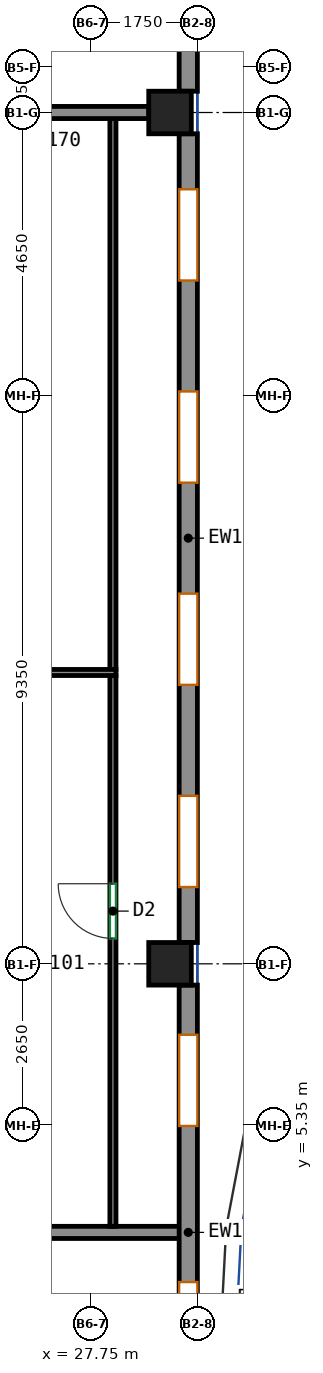
"""IFC4 building model, lengths in metres.
Left out: names, types, materials, properties, quantities, classifications, styles, units other than length and angle.
Written with IfcOpenShell. Run it as: python <this file> out.ifc"""

import sys

from ifc_helpers import new_model, si_unit, direction, frame, frame_2d, origin, origin_2d, place, context, subcontext, project, spatial, rectangle, extrude, source, transform, mapped, element, fill, save


model = new_model("IFC4")
c1 = context("Model", 3, precision=1e-05, world=origin(), true_north=direction((0.0, 1.0)))
c2 = subcontext(c1, "Body", "Model", "MODEL_VIEW")
j1 = project(units=[si_unit("LENGTHUNIT", "METRE"), si_unit("PLANEANGLEUNIT", "RADIAN")], contexts=[c1])
p1 = place(None, origin())
s1 = spatial("IfcSite", under=j1, at=p1, CompositionType="ELEMENT")
p2 = place(p1, origin())
s2 = spatial("IfcBuilding", under=s1, at=p2, CompositionType="ELEMENT")
p3 = place(p2, frame((0.0, 0.0, 252.6)))
s3 = spatial("IfcBuildingStorey", under=s2, at=p3, CompositionType="ELEMENT", Elevation=252.6)
m1 = source(origin(), c2, "Body", "SweptSolid", [
    extrude(rectangle(XDim=0.7, YDim=0.7, at=origin_2d()), origin(), (0.0, 0.0, 1.0), 3.12),
])
for number, where, z_axis, x_axis in (
    (1, (29.05, 8.0, 0.0), (0.0, 0.0, 1.0), (1.0, 0.0, 0.0)),
    (2, (29.05, 22.0, 0.0), (0.0, 0.0, 1.0), (1.0, 0.0, 0.0)),
):
    element("IfcColumn", number, at=place(p3, frame(where, z_axis=z_axis, x_axis=x_axis)), inside=s3, PredefinedType="COLUMN", context=c2, shape_type="MappedRepresentation", body=[
        mapped(m1, transform((0.0, 0.0, 0.0))),
    ])
m2 = source(origin(), c2, "Body", "SweptSolid", [
    extrude(rectangle(XDim=8.133, YDim=0.3, at=frame_2d((4.067, 0.0))), origin(), (0.0, 0.0, 1.0), 3.12),
])
p4 = place(p3, frame((29.35, -0.483, 0.0), z_axis=(0.0, 0.0, 1.0), x_axis=(0.0, 1.0, 0.0)))
e3 = element("IfcWall", 3, at=p4, inside=s3, PredefinedType="SOLIDWALL", context=c2, shape_type="MappedRepresentation", body=[
    mapped(m2, transform((0.0, 0.0, 0.0))),
])
p5 = place(p4, frame((1.75, 0.0, 0.8)))
e4 = element("IfcOpeningElement", 4, at=p5, cuts=e3, PredefinedType="OPENING", context=c2, shape_type="SweptSolid", body=[
    extrude(rectangle(XDim=1.5, YDim=2.05, at=frame_2d((0.75, 1.025))), frame((0.0, 0.16, 0.0), z_axis=(0.0, -1.0, 0.0), x_axis=(1.0, 0.0, 0.0)), (0.0, 0.0, 1.0), 0.32),
])
p6 = place(p4, frame((5.817, 0.0, 0.8)))
e5 = element("IfcOpeningElement", 5, at=p6, cuts=e3, PredefinedType="OPENING", context=c2, shape_type="SweptSolid", body=[
    extrude(rectangle(XDim=1.5, YDim=2.05, at=frame_2d((0.75, 1.025))), frame((0.0, 0.16, 0.0), z_axis=(0.0, -1.0, 0.0), x_axis=(1.0, 0.0, 0.0)), (0.0, 0.0, 1.0), 0.32),
])
m3 = source(origin(), c2, "Body", "SweptSolid", [
    extrude(rectangle(XDim=13.3, YDim=0.3, at=frame_2d((6.65, 0.0))), origin(), (0.0, 0.0, 1.0), 3.12),
])
p7 = place(p3, frame((29.35, 8.35, 0.0), z_axis=(0.0, 0.0, 1.0), x_axis=(0.0, 1.0, 0.0)))
e6 = element("IfcWall", 6, at=p7, inside=s3, PredefinedType="SOLIDWALL", context=c2, shape_type="MappedRepresentation", body=[
    mapped(m3, transform((0.0, 0.0, 0.0))),
])
p8 = place(p7, frame((0.913, 0.0, 0.8)))
e7 = element("IfcOpeningElement", 7, at=p8, cuts=e6, PredefinedType="OPENING", context=c2, shape_type="SweptSolid", body=[
    extrude(rectangle(XDim=1.5, YDim=2.05, at=frame_2d((0.75, 1.025))), frame((0.0, 0.16, 0.0), z_axis=(0.0, -1.0, 0.0), x_axis=(1.0, 0.0, 0.0)), (0.0, 0.0, 1.0), 0.32),
])
p9 = place(p7, frame((4.238, 0.0, 0.8)))
e8 = element("IfcOpeningElement", 8, at=p9, cuts=e6, PredefinedType="OPENING", context=c2, shape_type="SweptSolid", body=[
    extrude(rectangle(XDim=1.5, YDim=2.05, at=frame_2d((0.75, 1.025))), frame((0.0, 0.16, 0.0), z_axis=(0.0, -1.0, 0.0), x_axis=(1.0, 0.0, 0.0)), (0.0, 0.0, 1.0), 0.32),
])
p10 = place(p7, frame((7.562, 0.0, 0.8)))
e9 = element("IfcOpeningElement", 9, at=p10, cuts=e6, PredefinedType="OPENING", context=c2, shape_type="SweptSolid", body=[
    extrude(rectangle(XDim=1.5, YDim=2.05, at=frame_2d((0.75, 1.025))), frame((0.0, 0.16, 0.0), z_axis=(0.0, -1.0, 0.0), x_axis=(1.0, 0.0, 0.0)), (0.0, 0.0, 1.0), 0.32),
])
p11 = place(p7, frame((10.887, 0.0, 0.8)))
e10 = element("IfcOpeningElement", 10, at=p11, cuts=e6, PredefinedType="OPENING", context=c2, shape_type="SweptSolid", body=[
    extrude(rectangle(XDim=1.5, YDim=2.05, at=frame_2d((0.75, 1.025))), frame((0.0, 0.16, 0.0), z_axis=(0.0, -1.0, 0.0), x_axis=(1.0, 0.0, 0.0)), (0.0, 0.0, 1.0), 0.32),
])
m4 = source(origin(), c2, "Body", "SweptSolid", [
    extrude(rectangle(XDim=4.3, YDim=0.3, at=frame_2d((2.15, 0.0))), origin(), (0.0, 0.0, 1.0), 3.12),
])
p12 = place(p3, frame((29.35, 22.35, 0.0), z_axis=(0.0, 0.0, 1.0), x_axis=(0.0, 1.0, 0.0)))
e11 = element("IfcWall", 11, at=p12, inside=s3, PredefinedType="SOLIDWALL", context=c2, shape_type="MappedRepresentation", body=[
    mapped(m4, transform((0.0, 0.0, 0.0))),
])
p13 = place(p12, frame((1.75, 0.0, 0.8)))
e12 = element("IfcOpeningElement", 12, at=p13, cuts=e11, PredefinedType="OPENING", context=c2, shape_type="SweptSolid", body=[
    extrude(rectangle(XDim=1.5, YDim=2.05, at=frame_2d((0.75, 1.025))), frame((0.0, 0.16, 0.0), z_axis=(0.0, -1.0, 0.0), x_axis=(1.0, 0.0, 0.0)), (0.0, 0.0, 1.0), 0.32),
])
p14 = place(p3, frame((20.727, 3.583, 0.0), z_axis=(0.0, 0.0, 1.0), x_axis=(1.0, 0.0, 0.0)))
e13 = element("IfcWall", 13, at=p14, inside=s3, PredefinedType="PARTITIONING", context=c2, shape_type="SweptSolid", body=[
    extrude(rectangle(XDim=8.523, YDim=0.2, at=frame_2d((4.261, 0.0))), origin(), (0.0, 0.0, 1.0), 3.12),
])
p15 = place(p3, frame((28.111, 3.683, 0.0), z_axis=(0.0, 0.0, 1.0), x_axis=(0.0, 1.0, 0.0)))
e14 = element("IfcWall", 14, at=p15, inside=s3, PredefinedType="PARTITIONING", context=c2, shape_type="SweptSolid", body=[
    extrude(rectangle(XDim=9.058, YDim=0.1, at=frame_2d((4.529, 0.0))), origin(), (0.0, 0.0, 1.0), 3.12),
])
p16 = place(p15, frame((4.734, 0.0, 0.0)))
e15 = element("IfcOpeningElement", 15, at=p16, cuts=e14, PredefinedType="OPENING", context=c2, shape_type="SweptSolid", body=[
    extrude(rectangle(XDim=0.9, YDim=2.1, at=frame_2d((0.45, 1.05))), frame((0.0, 0.06, 0.0), z_axis=(0.0, -1.0, 0.0), x_axis=(1.0, 0.0, 0.0)), (0.0, 0.0, 1.0), 0.12),
])
p17 = place(p3, frame((28.111, 12.841, 0.0), z_axis=(0.0, 0.0, 1.0), x_axis=(0.0, 1.0, 0.0)))
e16 = element("IfcWall", 16, at=p17, inside=s3, PredefinedType="PARTITIONING", context=c2, shape_type="SweptSolid", body=[
    extrude(rectangle(XDim=9.059, YDim=0.1, at=frame_2d((4.529, 0.0))), origin(), (0.0, 0.0, 1.0), 3.12),
])
p18 = place(p3, frame((20.727, 22.0, 0.0), z_axis=(0.0, 0.0, 1.0), x_axis=(1.0, 0.0, 0.0)))
e17 = element("IfcWall", 17, at=p18, inside=s3, PredefinedType="PARTITIONING", context=c2, shape_type="SweptSolid", body=[
    extrude(rectangle(XDim=7.973, YDim=0.2, at=frame_2d((3.986, 0.0))), origin(), (0.0, 0.0, 1.0), 2.57),
])
p19 = place(p3, frame((21.7, 12.791, 0.0), z_axis=(0.0, 0.0, 1.0), x_axis=(1.0, 0.0, 0.0)))
e18 = element("IfcWall", 18, at=p19, inside=s3, PredefinedType="PARTITIONING", context=c2, shape_type="SweptSolid", body=[
    extrude(rectangle(XDim=6.461, YDim=0.1, at=frame_2d((3.23, 0.0))), origin(), (0.0, 0.0, 1.0), 3.12),
])
p20 = place(p19, frame((4.356, 0.0, 0.0)))
e19 = element("IfcOpeningElement", 19, at=p20, cuts=e18, PredefinedType="OPENING", context=c2, shape_type="SweptSolid", body=[
    extrude(rectangle(XDim=0.9, YDim=2.1, at=frame_2d((0.45, 1.05))), frame((0.0, 0.06, 0.0), z_axis=(0.0, -1.0, 0.0), x_axis=(1.0, 0.0, 0.0)), (0.0, 0.0, 1.0), 0.12),
])
p21 = place(p5, origin())
e20 = element("IfcWindow", 20, at=p21, inside=s3, PartitioningType="SINGLE_PANEL", PredefinedType="WINDOW", context=c2, shape_type="SweptSolid", body=[
    extrude(rectangle(XDim=1.5, YDim=2.05, at=frame_2d((0.75, 1.025))), frame((0.0, 0.03, 0.0), z_axis=(0.0, -1.0, 0.0), x_axis=(1.0, 0.0, 0.0)), (0.0, 0.0, 1.0), 0.06),
])
fill(e4, e20)
p22 = place(p6, origin())
e21 = element("IfcWindow", 21, at=p22, inside=s3, PartitioningType="SINGLE_PANEL", PredefinedType="WINDOW", context=c2, shape_type="SweptSolid", body=[
    extrude(rectangle(XDim=1.5, YDim=2.05, at=frame_2d((0.75, 1.025))), frame((0.0, 0.03, 0.0), z_axis=(0.0, -1.0, 0.0), x_axis=(1.0, 0.0, 0.0)), (0.0, 0.0, 1.0), 0.06),
])
fill(e5, e21)
p23 = place(p8, origin())
e22 = element("IfcWindow", 22, at=p23, inside=s3, PartitioningType="SINGLE_PANEL", PredefinedType="WINDOW", context=c2, shape_type="SweptSolid", body=[
    extrude(rectangle(XDim=1.5, YDim=2.05, at=frame_2d((0.75, 1.025))), frame((0.0, 0.03, 0.0), z_axis=(0.0, -1.0, 0.0), x_axis=(1.0, 0.0, 0.0)), (0.0, 0.0, 1.0), 0.06),
])
fill(e7, e22)
p24 = place(p9, origin())
e23 = element("IfcWindow", 23, at=p24, inside=s3, PartitioningType="SINGLE_PANEL", PredefinedType="WINDOW", context=c2, shape_type="SweptSolid", body=[
    extrude(rectangle(XDim=1.5, YDim=2.05, at=frame_2d((0.75, 1.025))), frame((0.0, 0.03, 0.0), z_axis=(0.0, -1.0, 0.0), x_axis=(1.0, 0.0, 0.0)), (0.0, 0.0, 1.0), 0.06),
])
fill(e8, e23)
p25 = place(p10, origin())
e24 = element("IfcWindow", 24, at=p25, inside=s3, PartitioningType="SINGLE_PANEL", PredefinedType="WINDOW", context=c2, shape_type="SweptSolid", body=[
    extrude(rectangle(XDim=1.5, YDim=2.05, at=frame_2d((0.75, 1.025))), frame((0.0, 0.03, 0.0), z_axis=(0.0, -1.0, 0.0), x_axis=(1.0, 0.0, 0.0)), (0.0, 0.0, 1.0), 0.06),
])
fill(e9, e24)
p26 = place(p11, origin())
e25 = element("IfcWindow", 25, at=p26, inside=s3, PartitioningType="SINGLE_PANEL", PredefinedType="WINDOW", context=c2, shape_type="SweptSolid", body=[
    extrude(rectangle(XDim=1.5, YDim=2.05, at=frame_2d((0.75, 1.025))), frame((0.0, 0.03, 0.0), z_axis=(0.0, -1.0, 0.0), x_axis=(1.0, 0.0, 0.0)), (0.0, 0.0, 1.0), 0.06),
])
fill(e10, e25)
p27 = place(p16, origin())
e26 = element("IfcDoor", 26, at=p27, inside=s3, OperationType="SINGLE_SWING_RIGHT", PredefinedType="DOOR", context=c2, shape_type="SweptSolid", body=[
    extrude(rectangle(XDim=0.9, YDim=2.1, at=frame_2d((0.45, 1.05))), frame((0.0, 0.025, 0.0), z_axis=(0.0, -1.0, 0.0), x_axis=(1.0, 0.0, 0.0)), (0.0, 0.0, 1.0), 0.05),
])
fill(e15, e26)
save(model, sys.argv[1])
